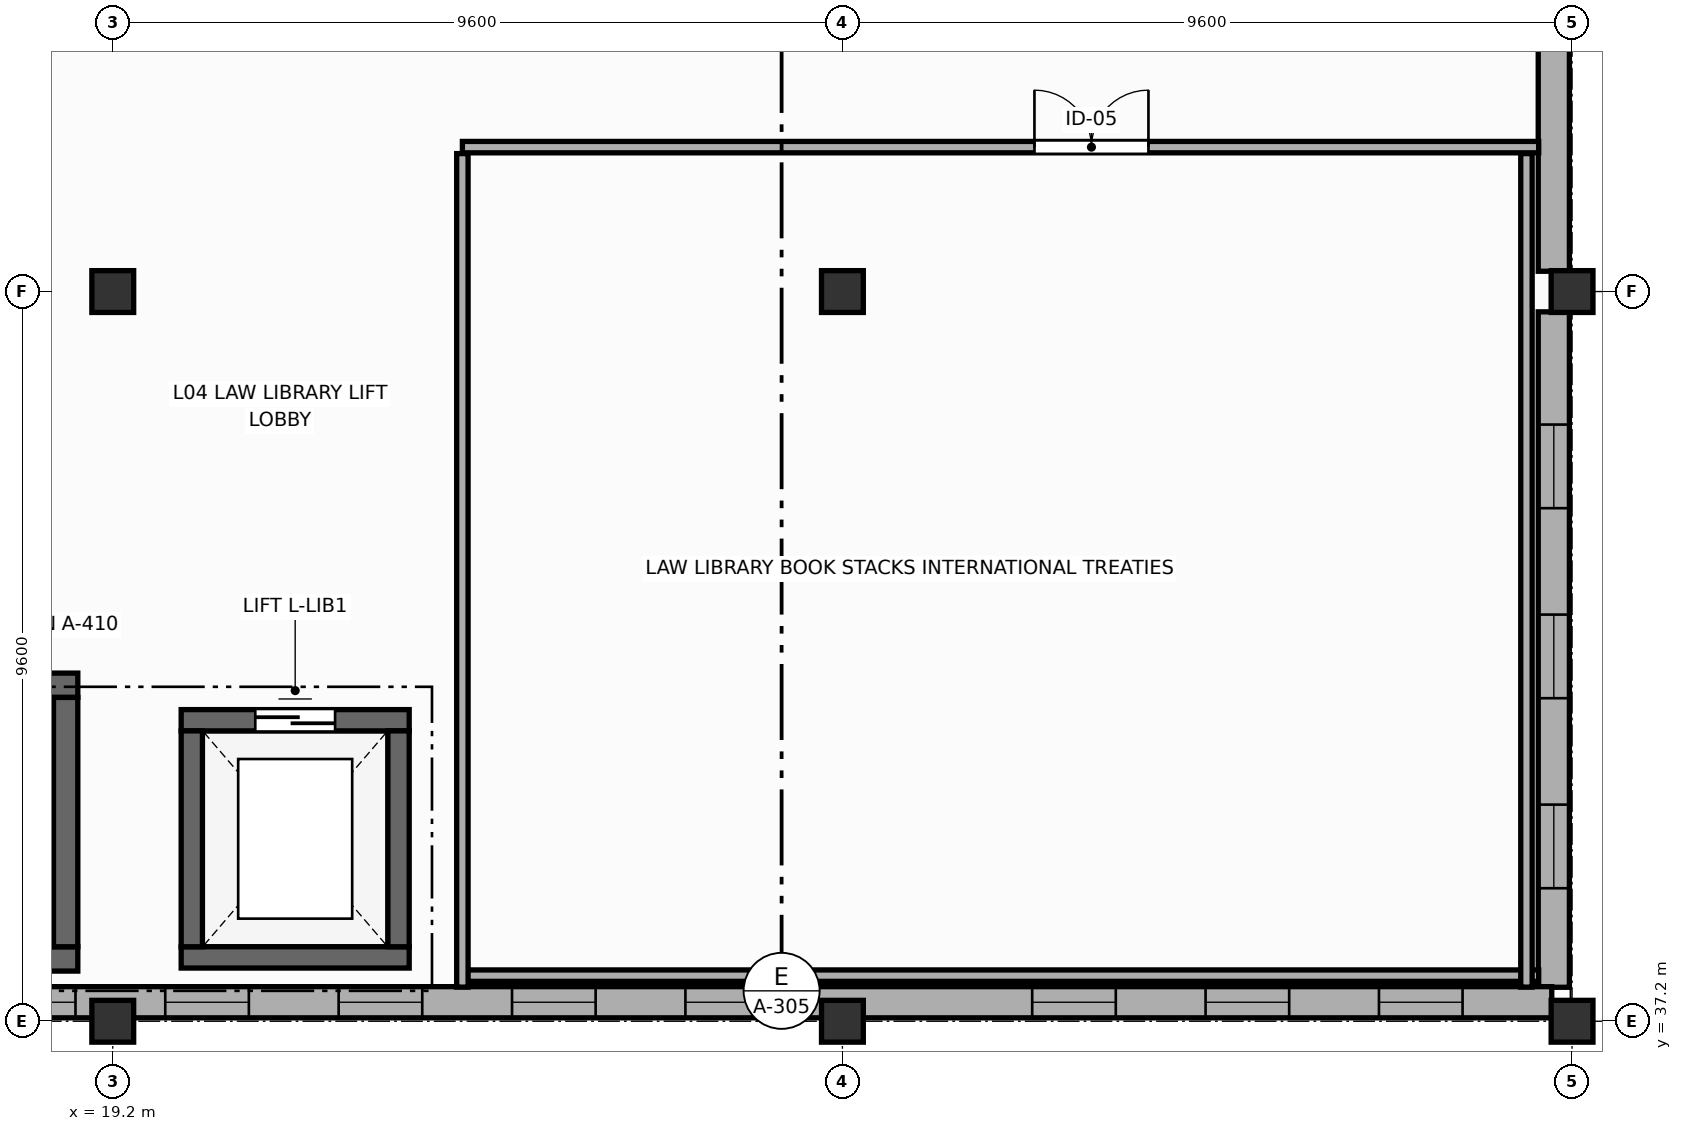
"""IFC4 building model, lengths in metres.
Left out: names, types, materials, properties, quantities, classifications, styles, units other than length and angle.
Written with IfcOpenShell. Run it as: python <this file> out.ifc"""

import sys

from ifc_helpers import new_model, si_unit, direction, frame, frame_2d, origin, origin_2d, place, context, subcontext, project, spatial, rectangle, extrude, element, fill, save


model = new_model("IFC4")
c1 = context("Model", 3, precision=1e-05, world=origin(), true_north=direction((0.0, 1.0)))
c2 = subcontext(c1, "Body", "Model", "MODEL_VIEW")
j1 = project(units=[si_unit("LENGTHUNIT", "METRE"), si_unit("PLANEANGLEUNIT", "RADIAN")], contexts=[c1])
p1 = place(None, origin())
s1 = spatial("IfcSite", under=j1, at=p1, CompositionType="ELEMENT")
p2 = place(p1, origin())
s2 = spatial("IfcBuilding", under=s1, at=p2, CompositionType="ELEMENT")
p3 = place(p2, frame((0.0, 0.0, 14.4)))
s3 = spatial("IfcBuildingStorey", under=s2, at=p3, CompositionType="ELEMENT", Elevation=14.4)
for number, where, z_axis, x_axis in (
    (1, (19.2, 37.2, 0.0), (0.0, 0.0, 1.0), (1.0, 0.0, 0.0)),
    (2, (19.2, 46.8, 0.0), (0.0, 0.0, 1.0), (1.0, 0.0, 0.0)),
    (3, (28.8, 37.2, 0.0), (0.0, 0.0, 1.0), (1.0, 0.0, 0.0)),
    (4, (28.8, 46.8, 0.0), (0.0, 0.0, 1.0), (1.0, 0.0, 0.0)),
    (5, (38.4, 37.2, 0.0), (0.0, 0.0, 1.0), (1.0, 0.0, 0.0)),
    (6, (38.4, 46.8, 0.0), (0.0, 0.0, 1.0), (1.0, 0.0, 0.0)),
):
    element("IfcColumn", number, at=place(p3, frame(where, z_axis=z_axis, x_axis=x_axis)), inside=s3, PredefinedType="COLUMN", context=c2, shape_type="SweptSolid", body=[
        extrude(rectangle(XDim=0.55, YDim=0.55, at=origin_2d()), origin(), (0.0, 0.0, 1.0), 4.2),
    ])
p4 = place(p3, frame((38.16, 46.533, 0.0), z_axis=(0.0, 0.0, 1.0), x_axis=(0.0, -1.0, 0.0)))
e7 = element("IfcWall", 7, at=p4, inside=s3, PredefinedType="STANDARD", context=c2, shape_type="SweptSolid", body=[
    extrude(rectangle(XDim=8.886, YDim=0.41, at=frame_2d((4.443, 0.0))), origin(), (0.0, 0.0, 1.0), 3.08),
])
p5 = place(p4, frame((1.483, 0.0, 0.9)))
e8 = element("IfcOpeningElement", 8, at=p5, cuts=e7, PredefinedType="OPENING", context=c2, shape_type="SweptSolid", body=[
    extrude(rectangle(XDim=1.1, YDim=1.85, at=frame_2d((0.55, 0.925))), frame((0.0, 0.215, 0.0), z_axis=(0.0, -1.0, 0.0), x_axis=(1.0, 0.0, 0.0)), (0.0, 0.0, 1.0), 0.43),
])
p6 = place(p4, frame((3.983, 0.0, 0.9)))
e9 = element("IfcOpeningElement", 9, at=p6, cuts=e7, PredefinedType="OPENING", context=c2, shape_type="SweptSolid", body=[
    extrude(rectangle(XDim=1.1, YDim=1.85, at=frame_2d((0.55, 0.925))), frame((0.0, 0.215, 0.0), z_axis=(0.0, -1.0, 0.0), x_axis=(1.0, 0.0, 0.0)), (0.0, 0.0, 1.0), 0.43),
])
p7 = place(p4, frame((6.483, 0.0, 0.9)))
e10 = element("IfcOpeningElement", 10, at=p7, cuts=e7, PredefinedType="OPENING", context=c2, shape_type="SweptSolid", body=[
    extrude(rectangle(XDim=1.1, YDim=1.85, at=frame_2d((0.55, 0.925))), frame((0.0, 0.215, 0.0), z_axis=(0.0, -1.0, 0.0), x_axis=(1.0, 0.0, 0.0)), (0.0, 0.0, 1.0), 0.43),
])
p8 = place(p3, frame((38.16, 56.133, 0.0), z_axis=(0.0, 0.0, 1.0), x_axis=(0.0, -1.0, 0.0)))
e11 = element("IfcWall", 11, at=p8, inside=s3, PredefinedType="STANDARD", context=c2, shape_type="SweptSolid", body=[
    extrude(rectangle(XDim=9.066, YDim=0.41, at=frame_2d((4.533, 0.0))), origin(), (0.0, 0.0, 1.0), 3.08),
])
p9 = place(p8, frame((1.483, 0.0, 0.9)))
e12 = element("IfcOpeningElement", 12, at=p9, cuts=e11, PredefinedType="OPENING", context=c2, shape_type="SweptSolid", body=[
    extrude(rectangle(XDim=1.1, YDim=1.85, at=frame_2d((0.55, 0.925))), frame((0.0, 0.215, 0.0), z_axis=(0.0, -1.0, 0.0), x_axis=(1.0, 0.0, 0.0)), (0.0, 0.0, 1.0), 0.43),
])
p10 = place(p3, frame((38.133, 37.45, 0.0), z_axis=(0.0, 0.0, 1.0), x_axis=(-1.0, 0.0, 0.0)))
e13 = element("IfcWall", 13, at=p10, inside=s3, PredefinedType="STANDARD", context=c2, shape_type="SweptSolid", body=[
    extrude(rectangle(XDim=37.696, YDim=0.41, at=frame_2d((18.848, 0.0))), origin(), (0.0, 0.0, 1.0), 2.93),
])
p11 = place(p10, frame((1.174, 0.0, 0.9)))
e14 = element("IfcOpeningElement", 14, at=p11, cuts=e13, PredefinedType="OPENING", context=c2, shape_type="SweptSolid", body=[
    extrude(rectangle(XDim=1.1, YDim=1.85, at=frame_2d((0.55, 0.925))), frame((0.0, 0.215, 0.0), z_axis=(0.0, -1.0, 0.0), x_axis=(1.0, 0.0, 0.0)), (0.0, 0.0, 1.0), 0.43),
])
p12 = place(p10, frame((3.455, 0.0, 0.9)))
e15 = element("IfcOpeningElement", 15, at=p12, cuts=e13, PredefinedType="OPENING", context=c2, shape_type="SweptSolid", body=[
    extrude(rectangle(XDim=1.1, YDim=1.85, at=frame_2d((0.55, 0.925))), frame((0.0, 0.215, 0.0), z_axis=(0.0, -1.0, 0.0), x_axis=(1.0, 0.0, 0.0)), (0.0, 0.0, 1.0), 0.43),
])
p13 = place(p10, frame((5.736, 0.0, 0.9)))
e16 = element("IfcOpeningElement", 16, at=p13, cuts=e13, PredefinedType="OPENING", context=c2, shape_type="SweptSolid", body=[
    extrude(rectangle(XDim=1.1, YDim=1.85, at=frame_2d((0.55, 0.925))), frame((0.0, 0.215, 0.0), z_axis=(0.0, -1.0, 0.0), x_axis=(1.0, 0.0, 0.0)), (0.0, 0.0, 1.0), 0.43),
])
p14 = place(p10, frame((10.299, 0.0, 0.9)))
e17 = element("IfcOpeningElement", 17, at=p14, cuts=e13, PredefinedType="OPENING", context=c2, shape_type="SweptSolid", body=[
    extrude(rectangle(XDim=1.1, YDim=1.85, at=frame_2d((0.55, 0.925))), frame((0.0, 0.215, 0.0), z_axis=(0.0, -1.0, 0.0), x_axis=(1.0, 0.0, 0.0)), (0.0, 0.0, 1.0), 0.43),
])
p15 = place(p10, frame((12.58, 0.0, 0.9)))
e18 = element("IfcOpeningElement", 18, at=p15, cuts=e13, PredefinedType="OPENING", context=c2, shape_type="SweptSolid", body=[
    extrude(rectangle(XDim=1.1, YDim=1.85, at=frame_2d((0.55, 0.925))), frame((0.0, 0.215, 0.0), z_axis=(0.0, -1.0, 0.0), x_axis=(1.0, 0.0, 0.0)), (0.0, 0.0, 1.0), 0.43),
])
p16 = place(p10, frame((14.861, 0.0, 0.9)))
e19 = element("IfcOpeningElement", 19, at=p16, cuts=e13, PredefinedType="OPENING", context=c2, shape_type="SweptSolid", body=[
    extrude(rectangle(XDim=1.1, YDim=1.85, at=frame_2d((0.55, 0.925))), frame((0.0, 0.215, 0.0), z_axis=(0.0, -1.0, 0.0), x_axis=(1.0, 0.0, 0.0)), (0.0, 0.0, 1.0), 0.43),
])
p17 = place(p10, frame((17.142, 0.0, 0.9)))
e20 = element("IfcOpeningElement", 20, at=p17, cuts=e13, PredefinedType="OPENING", context=c2, shape_type="SweptSolid", body=[
    extrude(rectangle(XDim=1.1, YDim=1.85, at=frame_2d((0.55, 0.925))), frame((0.0, 0.215, 0.0), z_axis=(0.0, -1.0, 0.0), x_axis=(1.0, 0.0, 0.0)), (0.0, 0.0, 1.0), 0.43),
])
p18 = place(p10, frame((19.424, 0.0, 0.9)))
e21 = element("IfcOpeningElement", 21, at=p18, cuts=e13, PredefinedType="OPENING", context=c2, shape_type="SweptSolid", body=[
    extrude(rectangle(XDim=1.1, YDim=1.85, at=frame_2d((0.55, 0.925))), frame((0.0, 0.215, 0.0), z_axis=(0.0, -1.0, 0.0), x_axis=(1.0, 0.0, 0.0)), (0.0, 0.0, 1.0), 0.43),
])
p19 = place(p10, frame((21.705, 0.0, 0.9)))
e22 = element("IfcOpeningElement", 22, at=p19, cuts=e13, PredefinedType="OPENING", context=c2, shape_type="SweptSolid", body=[
    extrude(rectangle(XDim=1.1, YDim=1.85, at=frame_2d((0.55, 0.925))), frame((0.0, 0.215, 0.0), z_axis=(0.0, -1.0, 0.0), x_axis=(1.0, 0.0, 0.0)), (0.0, 0.0, 1.0), 0.43),
])
p20 = place(p10, frame((23.986, 0.0, 0.9)))
e23 = element("IfcOpeningElement", 23, at=p20, cuts=e13, PredefinedType="OPENING", context=c2, shape_type="SweptSolid", body=[
    extrude(rectangle(XDim=1.1, YDim=1.85, at=frame_2d((0.55, 0.925))), frame((0.0, 0.215, 0.0), z_axis=(0.0, -1.0, 0.0), x_axis=(1.0, 0.0, 0.0)), (0.0, 0.0, 1.0), 0.43),
])
p21 = place(p10, frame((26.267, 0.0, 0.9)))
e24 = element("IfcOpeningElement", 24, at=p21, cuts=e13, PredefinedType="OPENING", context=c2, shape_type="SweptSolid", body=[
    extrude(rectangle(XDim=1.1, YDim=1.85, at=frame_2d((0.55, 0.925))), frame((0.0, 0.215, 0.0), z_axis=(0.0, -1.0, 0.0), x_axis=(1.0, 0.0, 0.0)), (0.0, 0.0, 1.0), 0.43),
])
p22 = place(p10, frame((33.111, 0.0, 0.9)))
e25 = element("IfcOpeningElement", 25, at=p22, cuts=e13, PredefinedType="OPENING", context=c2, shape_type="SweptSolid", body=[
    extrude(rectangle(XDim=1.1, YDim=1.85, at=frame_2d((0.55, 0.925))), frame((0.0, 0.215, 0.0), z_axis=(0.0, -1.0, 0.0), x_axis=(1.0, 0.0, 0.0)), (0.0, 0.0, 1.0), 0.43),
])
p23 = place(p10, frame((35.392, 0.0, 0.9)))
e26 = element("IfcOpeningElement", 26, at=p23, cuts=e13, PredefinedType="OPENING", context=c2, shape_type="SweptSolid", body=[
    extrude(rectangle(XDim=1.1, YDim=1.85, at=frame_2d((0.55, 0.925))), frame((0.0, 0.215, 0.0), z_axis=(0.0, -1.0, 0.0), x_axis=(1.0, 0.0, 0.0)), (0.0, 0.0, 1.0), 0.43),
])
for number, where, z_axis, x_axis in (
    (27, (9.86, 41.62, 0.0), (0.0, 0.0, 1.0), (1.0, 0.0, 0.0)),
    (28, (18.74, 38.02, 0.0), (0.0, 0.0, 1.0), (-1.0, 0.0, 0.0)),
):
    element("IfcWall", number, at=place(p3, frame(where, z_axis=z_axis, x_axis=x_axis)), inside=s3, PredefinedType="SHEAR", context=c2, shape_type="SweptSolid", body=[
        extrude(rectangle(XDim=8.88, YDim=0.32, at=frame_2d((4.44, 0.0))), origin(), (0.0, 0.0, 1.0), 3.96),
    ])
p24 = place(p3, frame((18.58, 41.46, 0.0), z_axis=(0.0, 0.0, 1.0), x_axis=(0.0, -1.0, 0.0)))
e29 = element("IfcWall", 29, at=p24, inside=s3, PredefinedType="SHEAR", context=c2, shape_type="SweptSolid", body=[
    extrude(rectangle(XDim=3.28, YDim=0.32, at=frame_2d((1.64, 0.0))), origin(), (0.0, 0.0, 1.0), 3.96),
])
p25 = place(p3, frame((20.1, 41.16, 0.0), z_axis=(0.0, 0.0, 1.0), x_axis=(1.0, 0.0, 0.0)))
e30 = element("IfcWall", 30, at=p25, inside=s3, PredefinedType="SHEAR", context=c2, shape_type="SweptSolid", body=[
    extrude(rectangle(XDim=3.0, YDim=0.28, at=frame_2d((1.5, 0.0))), origin(), (0.0, 0.0, 1.0), 3.96),
])
p26 = place(p25, frame((0.975, 0.0, 0.0)))
e31 = element("IfcOpeningElement", 31, at=p26, cuts=e30, PredefinedType="OPENING", context=c2, shape_type="SweptSolid", body=[
    extrude(rectangle(XDim=1.05, YDim=2.2, at=frame_2d((0.525, 1.1))), frame((0.0, 0.15, 0.0), z_axis=(0.0, -1.0, 0.0), x_axis=(1.0, 0.0, 0.0)), (0.0, 0.0, 1.0), 0.3),
])
p27 = place(p3, frame((23.1, 38.04, 0.0), z_axis=(0.0, 0.0, 1.0), x_axis=(-1.0, 0.0, 0.0)))
e32 = element("IfcWall", 32, at=p27, inside=s3, PredefinedType="SHEAR", context=c2, shape_type="SweptSolid", body=[
    extrude(rectangle(XDim=3.0, YDim=0.28, at=frame_2d((1.5, 0.0))), origin(), (0.0, 0.0, 1.0), 3.96),
])
for number, where, z_axis, x_axis in (
    (33, (20.24, 38.18, 0.0), (0.0, 0.0, 1.0), (0.0, 1.0, 0.0)),
    (34, (22.96, 41.02, 0.0), (0.0, 0.0, 1.0), (0.0, -1.0, 0.0)),
):
    element("IfcWall", number, at=place(p3, frame(where, z_axis=z_axis, x_axis=x_axis)), inside=s3, PredefinedType="SHEAR", context=c2, shape_type="SweptSolid", body=[
        extrude(rectangle(XDim=2.84, YDim=0.28, at=frame_2d((1.42, 0.0))), origin(), (0.0, 0.0, 1.0), 3.96),
    ])
p28 = place(p3, frame((23.8, 48.7, 0.0), z_axis=(0.0, 0.0, 1.0), x_axis=(1.0, 0.0, 0.0)))
e35 = element("IfcWall", 35, at=p28, inside=s3, PredefinedType="PARTITIONING", context=c2, shape_type="SweptSolid", body=[
    extrude(rectangle(XDim=14.161, YDim=0.15, at=frame_2d((7.081, 0.0))), origin(), (0.0, 0.0, 1.0), 3.08),
])
p29 = place(p28, frame((7.527, 0.0, 0.0)))
e36 = element("IfcOpeningElement", 36, at=p29, cuts=e35, PredefinedType="OPENING", context=c2, shape_type="SweptSolid", body=[
    extrude(rectangle(XDim=1.5, YDim=2.35, at=frame_2d((0.75, 1.175))), frame((0.0, 0.085, 0.0), z_axis=(0.0, -1.0, 0.0), x_axis=(1.0, 0.0, 0.0)), (0.0, 0.0, 1.0), 0.17),
])
p30 = place(p3, frame((37.961, 37.8, 0.0), z_axis=(0.0, 0.0, 1.0), x_axis=(-1.0, 0.0, 0.0)))
e37 = element("IfcWall", 37, at=p30, inside=s3, PredefinedType="PARTITIONING", context=c2, shape_type="SweptSolid", body=[
    extrude(rectangle(XDim=14.161, YDim=0.15, at=frame_2d((7.081, 0.0))), origin(), (0.0, 0.0, 1.0), 3.08),
])
for number, where, z_axis, x_axis in (
    (38, (23.8, 37.649, 0.0), (0.0, 0.0, 1.0), (0.0, 1.0, 0.0)),
    (39, (37.8, 48.615, 0.0), (0.0, 0.0, 1.0), (0.0, -1.0, 0.0)),
):
    element("IfcWall", number, at=place(p3, frame(where, z_axis=z_axis, x_axis=x_axis)), inside=s3, PredefinedType="PARTITIONING", context=c2, shape_type="SweptSolid", body=[
        extrude(rectangle(XDim=10.966, YDim=0.15, at=frame_2d((5.483, 0.0))), origin(), (0.0, 0.0, 1.0), 3.23),
    ])
p31 = place(p5, origin())
e40 = element("IfcWindow", 40, at=p31, inside=s3, PartitioningType="SINGLE_PANEL", PredefinedType="WINDOW", context=c2, shape_type="SweptSolid", body=[
    extrude(rectangle(XDim=1.1, YDim=1.85, at=frame_2d((0.55, 0.925))), frame((0.0, 0.03, 0.0), z_axis=(0.0, -1.0, 0.0), x_axis=(1.0, 0.0, 0.0)), (0.0, 0.0, 1.0), 0.06),
])
fill(e8, e40)
p32 = place(p6, origin())
e41 = element("IfcWindow", 41, at=p32, inside=s3, PartitioningType="SINGLE_PANEL", PredefinedType="WINDOW", context=c2, shape_type="SweptSolid", body=[
    extrude(rectangle(XDim=1.1, YDim=1.85, at=frame_2d((0.55, 0.925))), frame((0.0, 0.03, 0.0), z_axis=(0.0, -1.0, 0.0), x_axis=(1.0, 0.0, 0.0)), (0.0, 0.0, 1.0), 0.06),
])
fill(e9, e41)
p33 = place(p7, origin())
e42 = element("IfcWindow", 42, at=p33, inside=s3, PartitioningType="SINGLE_PANEL", PredefinedType="WINDOW", context=c2, shape_type="SweptSolid", body=[
    extrude(rectangle(XDim=1.1, YDim=1.85, at=frame_2d((0.55, 0.925))), frame((0.0, 0.03, 0.0), z_axis=(0.0, -1.0, 0.0), x_axis=(1.0, 0.0, 0.0)), (0.0, 0.0, 1.0), 0.06),
])
fill(e10, e42)
p34 = place(p11, origin())
e43 = element("IfcWindow", 43, at=p34, inside=s3, PartitioningType="SINGLE_PANEL", PredefinedType="WINDOW", context=c2, shape_type="SweptSolid", body=[
    extrude(rectangle(XDim=1.1, YDim=1.85, at=frame_2d((0.55, 0.925))), frame((0.0, 0.03, 0.0), z_axis=(0.0, -1.0, 0.0), x_axis=(1.0, 0.0, 0.0)), (0.0, 0.0, 1.0), 0.06),
])
fill(e14, e43)
p35 = place(p12, origin())
e44 = element("IfcWindow", 44, at=p35, inside=s3, PartitioningType="SINGLE_PANEL", PredefinedType="WINDOW", context=c2, shape_type="SweptSolid", body=[
    extrude(rectangle(XDim=1.1, YDim=1.85, at=frame_2d((0.55, 0.925))), frame((0.0, 0.03, 0.0), z_axis=(0.0, -1.0, 0.0), x_axis=(1.0, 0.0, 0.0)), (0.0, 0.0, 1.0), 0.06),
])
fill(e15, e44)
p36 = place(p13, origin())
e45 = element("IfcWindow", 45, at=p36, inside=s3, PartitioningType="SINGLE_PANEL", PredefinedType="WINDOW", context=c2, shape_type="SweptSolid", body=[
    extrude(rectangle(XDim=1.1, YDim=1.85, at=frame_2d((0.55, 0.925))), frame((0.0, 0.03, 0.0), z_axis=(0.0, -1.0, 0.0), x_axis=(1.0, 0.0, 0.0)), (0.0, 0.0, 1.0), 0.06),
])
fill(e16, e45)
p37 = place(p14, origin())
e46 = element("IfcWindow", 46, at=p37, inside=s3, PartitioningType="SINGLE_PANEL", PredefinedType="WINDOW", context=c2, shape_type="SweptSolid", body=[
    extrude(rectangle(XDim=1.1, YDim=1.85, at=frame_2d((0.55, 0.925))), frame((0.0, 0.03, 0.0), z_axis=(0.0, -1.0, 0.0), x_axis=(1.0, 0.0, 0.0)), (0.0, 0.0, 1.0), 0.06),
])
fill(e17, e46)
p38 = place(p15, origin())
e47 = element("IfcWindow", 47, at=p38, inside=s3, PartitioningType="SINGLE_PANEL", PredefinedType="WINDOW", context=c2, shape_type="SweptSolid", body=[
    extrude(rectangle(XDim=1.1, YDim=1.85, at=frame_2d((0.55, 0.925))), frame((0.0, 0.03, 0.0), z_axis=(0.0, -1.0, 0.0), x_axis=(1.0, 0.0, 0.0)), (0.0, 0.0, 1.0), 0.06),
])
fill(e18, e47)
p39 = place(p16, origin())
e48 = element("IfcWindow", 48, at=p39, inside=s3, PartitioningType="SINGLE_PANEL", PredefinedType="WINDOW", context=c2, shape_type="SweptSolid", body=[
    extrude(rectangle(XDim=1.1, YDim=1.85, at=frame_2d((0.55, 0.925))), frame((0.0, 0.03, 0.0), z_axis=(0.0, -1.0, 0.0), x_axis=(1.0, 0.0, 0.0)), (0.0, 0.0, 1.0), 0.06),
])
fill(e19, e48)
p40 = place(p17, origin())
e49 = element("IfcWindow", 49, at=p40, inside=s3, PartitioningType="SINGLE_PANEL", PredefinedType="WINDOW", context=c2, shape_type="SweptSolid", body=[
    extrude(rectangle(XDim=1.1, YDim=1.85, at=frame_2d((0.55, 0.925))), frame((0.0, 0.03, 0.0), z_axis=(0.0, -1.0, 0.0), x_axis=(1.0, 0.0, 0.0)), (0.0, 0.0, 1.0), 0.06),
])
fill(e20, e49)
p41 = place(p18, origin())
e50 = element("IfcWindow", 50, at=p41, inside=s3, PartitioningType="SINGLE_PANEL", PredefinedType="WINDOW", context=c2, shape_type="SweptSolid", body=[
    extrude(rectangle(XDim=1.1, YDim=1.85, at=frame_2d((0.55, 0.925))), frame((0.0, 0.03, 0.0), z_axis=(0.0, -1.0, 0.0), x_axis=(1.0, 0.0, 0.0)), (0.0, 0.0, 1.0), 0.06),
])
fill(e21, e50)
p42 = place(p26, origin())
e51 = element("IfcDoor", 51, at=p42, inside=s3, OperationType="DOUBLE_DOOR_SLIDING", PredefinedType="DOOR", context=c2, shape_type="SweptSolid", body=[
    extrude(rectangle(XDim=1.05, YDim=2.2, at=frame_2d((0.525, 1.1))), frame((0.0, 0.025, 0.0), z_axis=(0.0, -1.0, 0.0), x_axis=(1.0, 0.0, 0.0)), (0.0, 0.0, 1.0), 0.05),
])
fill(e31, e51)
p43 = place(p29, origin())
e52 = element("IfcDoor", 52, at=p43, inside=s3, OperationType="DOUBLE_DOOR_SINGLE_SWING", PredefinedType="DOOR", context=c2, shape_type="SweptSolid", body=[
    extrude(rectangle(XDim=1.5, YDim=2.35, at=frame_2d((0.75, 1.175))), frame((0.0, 0.025, 0.0), z_axis=(0.0, -1.0, 0.0), x_axis=(1.0, 0.0, 0.0)), (0.0, 0.0, 1.0), 0.05),
])
fill(e36, e52)
save(model, sys.argv[1])
